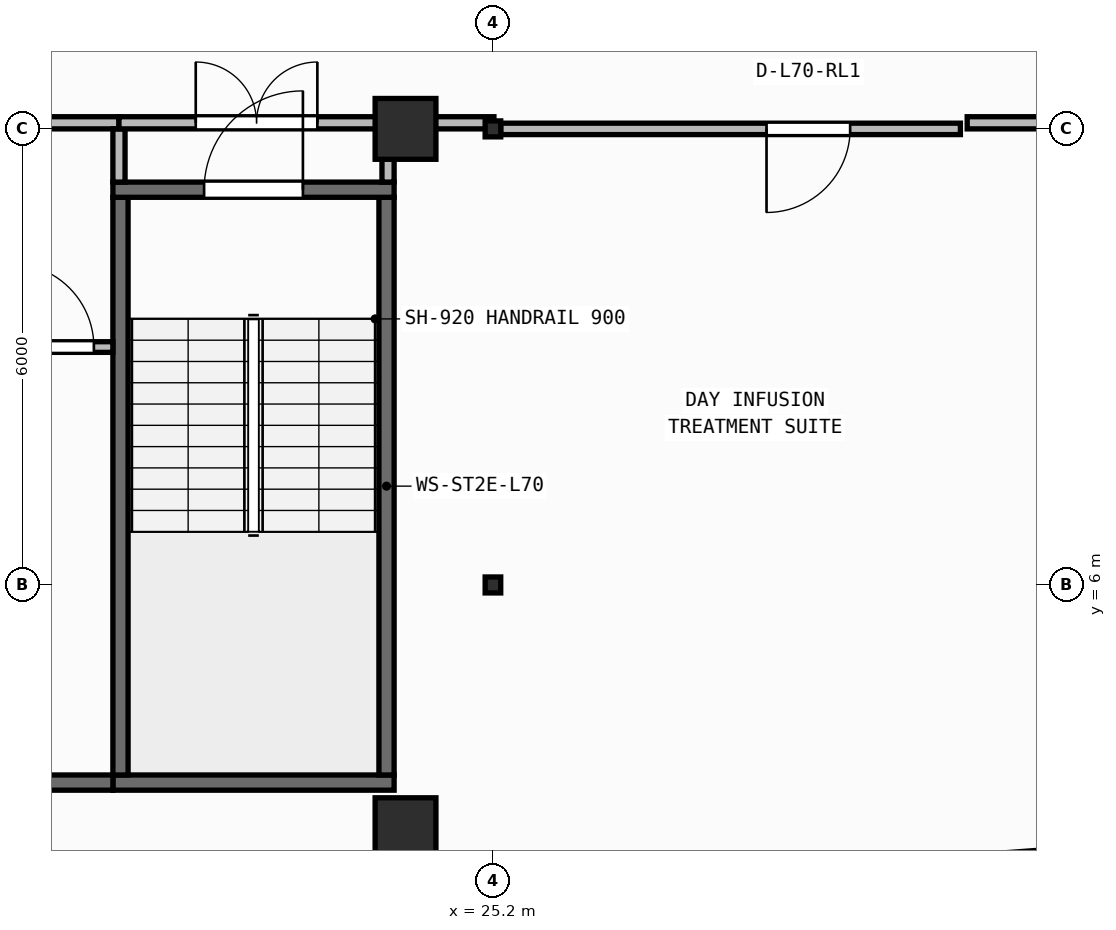
"""IFC4 building model, lengths in metres.
Left out: names, types, materials, properties, quantities, classifications, styles, units other than length and angle.
Written with IfcOpenShell. Run it as: python <this file> out.ifc"""

import sys

from ifc_helpers import new_model, si_unit, direction, frame, frame_2d, origin, origin_2d, place, context, subcontext, project, spatial, rectangle, i_section, extrude, element, fill, save


model = new_model("IFC4")
c1 = context("Model", 3, precision=1e-05, world=origin(), true_north=direction((0.0, 1.0)))
c2 = subcontext(c1, "Body", "Model", "MODEL_VIEW")
j1 = project(units=[si_unit("LENGTHUNIT", "METRE"), si_unit("PLANEANGLEUNIT", "RADIAN")], contexts=[c1])
p1 = place(None, origin())
s1 = spatial("IfcSite", under=j1, at=p1, CompositionType="ELEMENT")
p2 = place(p1, origin())
s2 = spatial("IfcBuilding", under=s1, at=p2, CompositionType="ELEMENT")
p3 = place(p2, frame((0.0, 0.0, 284.2)))
s3 = spatial("IfcBuildingStorey", under=s2, at=p3, CompositionType="ELEMENT", Elevation=284.2)
p4 = place(p3, frame((24.05, 2.8, 0.0), z_axis=(0.0, 0.0, 1.0), x_axis=(1.0, 0.0, 0.0)))
e1 = element("IfcColumn", 1, at=p4, inside=s3, PredefinedType="COLUMN", context=c2, shape_type="SweptSolid", body=[
    extrude(rectangle(XDim=0.8, YDim=0.8, at=origin_2d()), origin(), (0.0, 0.0, 1.0), 3.95),
])
p5 = place(p3, frame((25.2, 6.0, 0.0), z_axis=(0.0, 0.0, 1.0), x_axis=(1.0, 0.0, 0.0)))
e2 = element("IfcColumn", 2, at=p5, inside=s3, PredefinedType="COLUMN", context=c2, shape_type="SweptSolid", body=[
    extrude(i_section(OverallWidth=0.205, OverallDepth=0.21, WebThickness=0.009, FlangeThickness=0.014, FilletRadius=0.011, at=origin_2d()), origin(), (0.0, 0.0, 1.0), 3.95),
])
p6 = place(p3, frame((24.05, 12.0, 0.0), z_axis=(0.0, 0.0, 1.0), x_axis=(1.0, 0.0, 0.0)))
e3 = element("IfcColumn", 3, at=p6, inside=s3, PredefinedType="COLUMN", context=c2, shape_type="SweptSolid", body=[
    extrude(rectangle(XDim=0.8, YDim=0.8, at=origin_2d()), origin(), (0.0, 0.0, 1.0), 3.95),
])
p7 = place(p3, frame((25.2, 12.0, 0.0), z_axis=(0.0, 0.0, 1.0), x_axis=(1.0, 0.0, 0.0)))
e4 = element("IfcColumn", 4, at=p7, inside=s3, PredefinedType="COLUMN", context=c2, shape_type="SweptSolid", body=[
    extrude(i_section(OverallWidth=0.205, OverallDepth=0.21, WebThickness=0.009, FlangeThickness=0.014, FilletRadius=0.011, at=origin_2d()), origin(), (0.0, 0.0, 1.0), 3.95),
])
p8 = place(p3, frame((2.46, 0.172, 0.0), z_axis=(0.0, 0.0, 1.0), x_axis=(0.997289775118, 0.073573802713, 0.0)))
e5 = element("IfcWall", 5, at=p8, inside=s3, PredefinedType="STANDARD", context=c2, shape_type="SweptSolid", body=[
    extrude(rectangle(XDim=36.379, YDim=0.26, at=frame_2d((18.189, 0.0))), origin(), (0.0, 0.0, 1.0), 3.71),
])
p9 = place(p8, frame((16.989, 0.0, 0.9)))
e6 = element("IfcOpeningElement", 6, at=p9, cuts=e5, PredefinedType="OPENING", context=c2, shape_type="SweptSolid", body=[
    extrude(rectangle(XDim=2.4, YDim=1.65, at=frame_2d((1.2, 0.825))), frame((0.0, 0.14, 0.0), z_axis=(0.0, -1.0, 0.0), x_axis=(1.0, 0.0, 0.0)), (0.0, 0.0, 1.0), 0.28),
])
p10 = place(p3, frame((20.2, 3.4, 0.0), z_axis=(0.0, 0.0, 1.0), x_axis=(1.0, 0.0, 0.0)))
e7 = element("IfcWall", 7, at=p10, inside=s3, PredefinedType="SHEAR", context=c2, shape_type="SweptSolid", body=[
    extrude(rectangle(XDim=3.7, YDim=0.2, at=frame_2d((1.85, 0.0))), origin(), (0.0, 0.0, 1.0), 3.71),
])
for number, where, z_axis, x_axis in (
    (8, (20.3, 3.5, 0.0), (0.0, 0.0, 1.0), (0.0, 1.0, 0.0)),
    (9, (23.8, 3.5, 0.0), (0.0, 0.0, 1.0), (0.0, 1.0, 0.0)),
):
    element("IfcWall", number, at=place(p3, frame(where, z_axis=z_axis, x_axis=x_axis)), inside=s3, PredefinedType="SHEAR", context=c2, shape_type="SweptSolid", body=[
        extrude(rectangle(XDim=7.6, YDim=0.2, at=frame_2d((3.8, 0.0))), origin(), (0.0, 0.0, 1.0), 3.71),
    ])
p11 = place(p3, frame((20.2, 11.2, 0.0), z_axis=(0.0, 0.0, 1.0), x_axis=(1.0, 0.0, 0.0)))
e10 = element("IfcWall", 10, at=p11, inside=s3, PredefinedType="SHEAR", context=c2, shape_type="SweptSolid", body=[
    extrude(rectangle(XDim=3.7, YDim=0.2, at=frame_2d((1.85, 0.0))), origin(), (0.0, 0.0, 1.0), 3.71),
])
p12 = place(p11, frame((1.2, 0.0, 0.0)))
e11 = element("IfcOpeningElement", 11, at=p12, cuts=e10, PredefinedType="OPENING", context=c2, shape_type="SweptSolid", body=[
    extrude(rectangle(XDim=1.3, YDim=2.15, at=frame_2d((0.65, 1.075))), frame((0.0, 0.11, 0.0), z_axis=(0.0, -1.0, 0.0), x_axis=(1.0, 0.0, 0.0)), (0.0, 0.0, 1.0), 0.22),
])
p13 = place(p3, frame((6.5, 3.4, 0.0), z_axis=(0.0, 0.0, 1.0), x_axis=(1.0, 0.0, 0.0)))
e12 = element("IfcWall", 12, at=p13, inside=s3, PredefinedType="SHEAR", context=c2, shape_type="SweptSolid", body=[
    extrude(rectangle(XDim=13.7, YDim=0.2, at=frame_2d((6.85, 0.0))), origin(), (0.0, 0.0, 1.0), 3.71),
])
p14 = place(p3, frame((18.61, 9.13, 0.0), z_axis=(0.0, 0.0, 1.0), x_axis=(1.0, 0.0, 0.0)))
e13 = element("IfcWall", 13, at=p14, inside=s3, PredefinedType="PARTITIONING", context=c2, shape_type="SweptSolid", body=[
    extrude(rectangle(XDim=1.59, YDim=0.14, at=frame_2d((0.795, 0.0))), origin(), (0.0, 0.0, 1.0), 3.71),
])
p15 = place(p14, frame((0.24, 0.0, 0.0)))
e14 = element("IfcOpeningElement", 14, at=p15, cuts=e13, PredefinedType="OPENING", context=c2, shape_type="SweptSolid", body=[
    extrude(rectangle(XDim=1.1, YDim=2.1, at=frame_2d((0.55, 1.05))), frame((0.0, 0.08, 0.0), z_axis=(0.0, -1.0, 0.0), x_axis=(1.0, 0.0, 0.0)), (0.0, 0.0, 1.0), 0.16),
])
p16 = place(p3, frame((12.58, 12.08, 0.0), z_axis=(0.0, 0.0, 1.0), x_axis=(1.0, 0.0, 0.0)))
e15 = element("IfcWall", 15, at=p16, inside=s3, PredefinedType="PARTITIONING", context=c2, shape_type="SweptSolid", body=[
    extrude(rectangle(XDim=7.7, YDim=0.16, at=frame_2d((3.85, 0.0))), origin(), (0.0, 0.0, 1.0), 3.157),
])
p17 = place(p16, frame((3.05, 0.0, 0.0)))
e16 = element("IfcOpeningElement", 16, at=p17, cuts=e15, PredefinedType="OPENING", context=c2, shape_type="SweptSolid", body=[
    extrude(rectangle(XDim=1.6, YDim=2.05, at=frame_2d((0.8, 1.025))), frame((0.0, 0.09, 0.0), z_axis=(0.0, -1.0, 0.0), x_axis=(1.0, 0.0, 0.0)), (0.0, 0.0, 1.0), 0.18),
])
p18 = place(p3, frame((20.28, 11.3, 0.0), z_axis=(0.0, 0.0, 1.0), x_axis=(0.0, 1.0, 0.0)))
e17 = element("IfcWall", 17, at=p18, inside=s3, PredefinedType="PARTITIONING", context=c2, shape_type="SweptSolid", body=[
    extrude(rectangle(XDim=0.7, YDim=0.16, at=frame_2d((0.35, 0.0))), origin(), (0.0, 0.0, 1.0), 3.71),
])
p19 = place(p3, frame((20.28, 12.08, 0.0), z_axis=(0.0, 0.0, 1.0), x_axis=(1.0, 0.0, 0.0)))
e18 = element("IfcWall", 18, at=p19, inside=s3, PredefinedType="PARTITIONING", context=c2, shape_type="SweptSolid", body=[
    extrude(rectangle(XDim=3.62, YDim=0.16, at=frame_2d((1.81, 0.0))), origin(), (0.0, 0.0, 1.0), 3.157),
])
p20 = place(p19, frame((1.01, 0.0, 0.0)))
e19 = element("IfcOpeningElement", 19, at=p20, cuts=e18, PredefinedType="OPENING", context=c2, shape_type="SweptSolid", body=[
    extrude(rectangle(XDim=1.6, YDim=2.05, at=frame_2d((0.8, 1.025))), frame((0.0, 0.09, 0.0), z_axis=(0.0, -1.0, 0.0), x_axis=(1.0, 0.0, 0.0)), (0.0, 0.0, 1.0), 0.18),
])
p21 = place(p3, frame((23.82, 11.3, 0.0), z_axis=(0.0, 0.0, 1.0), x_axis=(0.0, 1.0, 0.0)))
e20 = element("IfcWall", 20, at=p21, inside=s3, PredefinedType="PARTITIONING", context=c2, shape_type="SweptSolid", body=[
    extrude(rectangle(XDim=0.7, YDim=0.16, at=frame_2d((0.35, 0.0))), origin(), (0.0, 0.0, 1.0), 3.71),
])
p22 = place(p3, frame((31.35, 12.0, 0.0), z_axis=(0.0, 0.0, 1.0), x_axis=(-1.0, 0.0, 0.0)))
e21 = element("IfcWall", 21, at=p22, inside=s3, PredefinedType="PARTITIONING", context=c2, shape_type="SweptSolid", body=[
    extrude(rectangle(XDim=6.048, YDim=0.15, at=frame_2d((3.024, 0.0))), origin(), (0.0, 0.0, 1.0), 3.157),
])
p23 = place(p22, frame((1.451, 0.0, 0.0)))
e22 = element("IfcOpeningElement", 22, at=p23, cuts=e21, PredefinedType="OPENING", context=c2, shape_type="SweptSolid", body=[
    extrude(rectangle(XDim=1.1, YDim=2.1, at=frame_2d((0.55, 1.05))), frame((0.0, 0.085, 0.0), z_axis=(0.0, -1.0, 0.0), x_axis=(1.0, 0.0, 0.0)), (0.0, 0.0, 1.0), 0.17),
])
p24 = place(p3, frame((24.02, 12.08, 0.0), z_axis=(0.0, 0.0, 1.0), x_axis=(1.0, 0.0, 0.0)))
e23 = element("IfcWall", 23, at=p24, inside=s3, PredefinedType="PARTITIONING", context=c2, shape_type="SweptSolid", body=[
    extrude(rectangle(XDim=1.193, YDim=0.16, at=frame_2d((0.597, 0.0))), origin(), (0.0, 0.0, 1.0), 3.157),
])
p25 = place(p3, frame((31.439, 12.08, 0.0), z_axis=(0.0, 0.0, 1.0), x_axis=(1.0, 0.0, 0.0)))
e24 = element("IfcWall", 24, at=p25, inside=s3, PredefinedType="PARTITIONING", context=c2, shape_type="SweptSolid", body=[
    extrude(rectangle(XDim=2.174, YDim=0.16, at=frame_2d((1.087, 0.0))), origin(), (0.0, 0.0, 1.0), 3.157),
])
p26 = place(p12, origin())
e25 = element("IfcDoor", 25, at=p26, inside=s3, OperationType="SINGLE_SWING_RIGHT", PredefinedType="DOOR", context=c2, shape_type="SweptSolid", body=[
    extrude(rectangle(XDim=1.3, YDim=2.15, at=frame_2d((0.65, 1.075))), frame((0.0, 0.025, 0.0), z_axis=(0.0, -1.0, 0.0), x_axis=(1.0, 0.0, 0.0)), (0.0, 0.0, 1.0), 0.05),
])
fill(e11, e25)
p27 = place(p15, origin())
e26 = element("IfcDoor", 26, at=p27, inside=s3, OperationType="SINGLE_SWING_LEFT", PredefinedType="DOOR", context=c2, shape_type="SweptSolid", body=[
    extrude(rectangle(XDim=1.1, YDim=2.1, at=frame_2d((0.55, 1.05))), frame((0.0, 0.025, 0.0), z_axis=(0.0, -1.0, 0.0), x_axis=(1.0, 0.0, 0.0)), (0.0, 0.0, 1.0), 0.05),
])
fill(e14, e26)
p28 = place(p20, origin())
e27 = element("IfcDoor", 27, at=p28, inside=s3, OperationType="DOUBLE_DOOR_SINGLE_SWING", PredefinedType="DOOR", context=c2, shape_type="SweptSolid", body=[
    extrude(rectangle(XDim=1.6, YDim=2.05, at=frame_2d((0.8, 1.025))), frame((0.0, 0.025, 0.0), z_axis=(0.0, -1.0, 0.0), x_axis=(1.0, 0.0, 0.0)), (0.0, 0.0, 1.0), 0.05),
])
fill(e19, e27)
p29 = place(p23, origin())
e28 = element("IfcDoor", 28, at=p29, inside=s3, OperationType="SINGLE_SWING_RIGHT", PredefinedType="DOOR", context=c2, shape_type="SweptSolid", body=[
    extrude(rectangle(XDim=1.1, YDim=2.1, at=frame_2d((0.55, 1.05))), frame((0.0, 0.025, 0.0), z_axis=(0.0, -1.0, 0.0), x_axis=(1.0, 0.0, 0.0)), (0.0, 0.0, 1.0), 0.05),
])
fill(e22, e28)
save(model, sys.argv[1])
